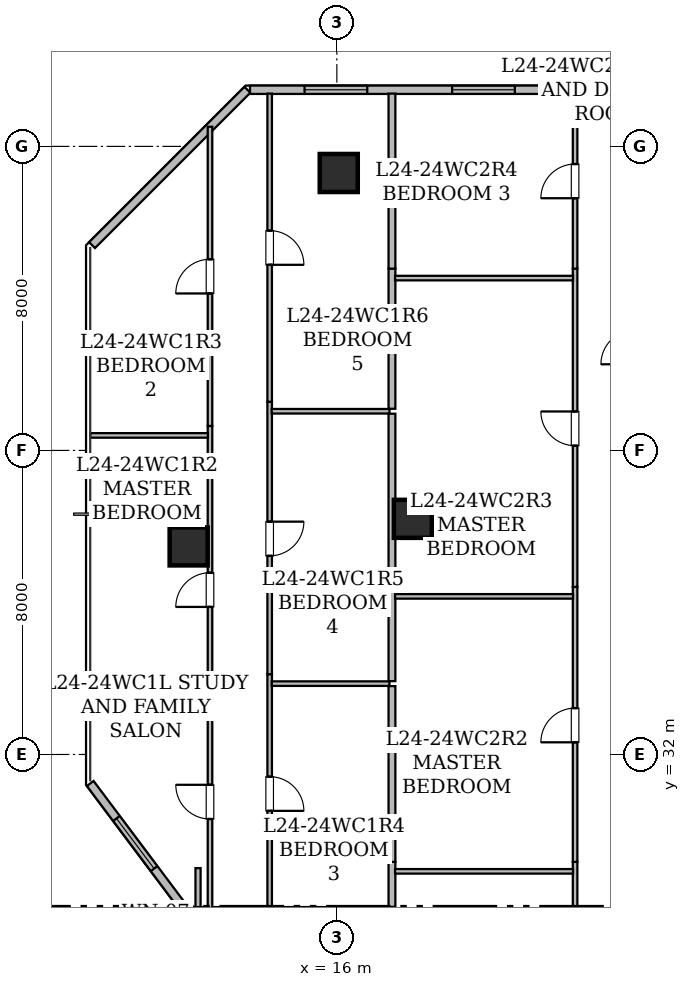
"""IFC4 building model, lengths in metres.
Left out: names, types, materials, properties, quantities, classifications, styles, units other than length and angle.
Written with IfcOpenShell. Run it as: python <this file> out.ifc"""

import sys

from ifc_helpers import new_model, si_unit, direction, frame, frame_2d, origin, origin_2d, place, context, subcontext, project, spatial, rectangle, hollow_rectangle, extrude, element, fill, save


model = new_model("IFC4")
c1 = context("Model", 3, precision=1e-05, world=origin(), true_north=direction((0.0, 1.0)))
c2 = subcontext(c1, "Body", "Model", "MODEL_VIEW")
j1 = project(units=[si_unit("LENGTHUNIT", "METRE"), si_unit("PLANEANGLEUNIT", "RADIAN")], contexts=[c1])
p1 = place(None, origin())
s1 = spatial("IfcSite", under=j1, at=p1, CompositionType="ELEMENT")
p2 = place(p1, origin())
s2 = spatial("IfcBuilding", under=s1, at=p2, CompositionType="ELEMENT")
p3 = place(p2, frame((0.0, 0.0, 98.25)))
s3 = spatial("IfcBuildingStorey", under=s2, at=p3, CompositionType="ELEMENT", Elevation=98.25)
for number, where, z_axis, x_axis in (
    (1, (16.05, 47.3, 0.0), (0.0, 0.0, 1.0), (1.0, 0.0, 0.0)),
    (2, (12.1, 37.475, 0.0), (0.0, 0.0, 1.0), (1.0, 0.0, 0.0)),
    (3, (18.0, 38.2, 0.0), (0.0, 0.0, 1.0), (1.0, 0.0, 0.0)),
):
    element("IfcColumn", number, at=place(p3, frame(where, z_axis=z_axis, x_axis=x_axis)), inside=s3, PredefinedType="COLUMN", context=c2, shape_type="SweptSolid", body=[
        extrude(hollow_rectangle(XDim=1.0, YDim=1.0, WallThickness=0.05, at=origin_2d()), origin(), (0.0, 0.0, 1.0), 3.65),
    ])
p4 = place(p3, frame((9.544, 24.808, 0.0), z_axis=(0.0, 0.0, 1.0), x_axis=(0.600019580308, 0.799985314394, 0.0)))
e4 = element("IfcWall", 4, at=p4, inside=s3, PredefinedType="STANDARD", context=c2, shape_type="SweptSolid", body=[
    extrude(rectangle(XDim=3.99, YDim=0.22, at=frame_2d((1.995, 0.0))), origin(), (0.0, 0.0, 1.0), 3.43),
])
p5 = place(p4, frame((2.147, 0.0, 0.85)))
e5 = element("IfcOpeningElement", 5, at=p5, cuts=e4, PredefinedType="OPENING", context=c2, shape_type="SweptSolid", body=[
    extrude(rectangle(XDim=1.35, YDim=1.5, at=frame_2d((0.675, 0.75))), frame((0.0, 0.12, 0.0), z_axis=(0.0, -1.0, 0.0), x_axis=(1.0, 0.0, 0.0)), (0.0, 0.0, 1.0), 0.24),
])
p6 = place(p3, frame((11.881, 28.077, 0.0), z_axis=(0.0, 0.0, 1.0), x_axis=(-0.600158184825, 0.799881336942, 0.0)))
e6 = element("IfcWall", 6, at=p6, inside=s3, PredefinedType="STANDARD", context=c2, shape_type="SweptSolid", body=[
    extrude(rectangle(XDim=3.951, YDim=0.22, at=frame_2d((1.975, 0.0))), origin(), (0.0, 0.0, 1.0), 3.43),
])
p7 = place(p6, frame((1.15, 0.0, 0.85)))
e7 = element("IfcOpeningElement", 7, at=p7, cuts=e6, PredefinedType="OPENING", context=c2, shape_type="SweptSolid", body=[
    extrude(rectangle(XDim=1.65, YDim=1.55, at=frame_2d((0.825, 0.775))), frame((0.0, 0.12, 0.0), z_axis=(0.0, -1.0, 0.0), x_axis=(1.0, 0.0, 0.0)), (0.0, 0.0, 1.0), 0.24),
])
p8 = place(p3, frame((9.558, 45.402, 0.0), z_axis=(0.0, 0.0, 1.0), x_axis=(0.707106781187, 0.707106781187, 0.0)))
e8 = element("IfcWall", 8, at=p8, inside=s3, PredefinedType="STANDARD", context=c2, shape_type="SweptSolid", body=[
    extrude(rectangle(XDim=5.781, YDim=0.22, at=frame_2d((2.891, 0.0))), origin(), (0.0, 0.0, 1.0), 3.43),
])
p9 = place(p3, frame((13.715, 49.49, 0.0), z_axis=(0.0, 0.0, 1.0), x_axis=(1.0, 0.0, 0.0)))
e9 = element("IfcWall", 9, at=p9, inside=s3, PredefinedType="STANDARD", context=c2, shape_type="SweptSolid", body=[
    extrude(rectangle(XDim=38.639, YDim=0.22, at=frame_2d((19.319, 0.0))), origin(), (0.0, 0.0, 1.0), 3.43),
])
p10 = place(p9, frame((1.435, 0.0, 0.85)))
e10 = element("IfcOpeningElement", 10, at=p10, cuts=e9, PredefinedType="OPENING", context=c2, shape_type="SweptSolid", body=[
    extrude(rectangle(XDim=1.65, YDim=1.55, at=frame_2d((0.825, 0.775))), frame((0.0, 0.12, 0.0), z_axis=(0.0, -1.0, 0.0), x_axis=(1.0, 0.0, 0.0)), (0.0, 0.0, 1.0), 0.24),
])
p11 = place(p9, frame((10.802, 0.0, 0.85)))
e11 = element("IfcOpeningElement", 11, at=p11, cuts=e9, PredefinedType="OPENING", context=c2, shape_type="SweptSolid", body=[
    extrude(rectangle(XDim=1.65, YDim=1.55, at=frame_2d((0.825, 0.775))), frame((0.0, 0.12, 0.0), z_axis=(0.0, -1.0, 0.0), x_axis=(1.0, 0.0, 0.0)), (0.0, 0.0, 1.0), 0.24),
])
p12 = place(p9, frame((8.744, 0.0, 0.8)))
e12 = element("IfcOpeningElement", 12, at=p12, cuts=e9, PredefinedType="OPENING", context=c2, shape_type="SweptSolid", body=[
    extrude(rectangle(XDim=1.2, YDim=1.5, at=frame_2d((0.6, 0.75))), frame((0.0, 0.12, 0.0), z_axis=(0.0, -1.0, 0.0), x_axis=(1.0, 0.0, 0.0)), (0.0, 0.0, 1.0), 0.24),
])
p13 = place(p9, frame((5.319, 0.0, 0.85)))
e13 = element("IfcOpeningElement", 13, at=p13, cuts=e9, PredefinedType="OPENING", context=c2, shape_type="SweptSolid", body=[
    extrude(rectangle(XDim=1.65, YDim=1.55, at=frame_2d((0.825, 0.775))), frame((0.0, 0.12, 0.0), z_axis=(0.0, -1.0, 0.0), x_axis=(1.0, 0.0, 0.0)), (0.0, 0.0, 1.0), 0.24),
])
p14 = place(p9, frame((15.556, 0.0, 0.85)))
e14 = element("IfcOpeningElement", 14, at=p14, cuts=e9, PredefinedType="OPENING", context=c2, shape_type="SweptSolid", body=[
    extrude(rectangle(XDim=1.65, YDim=1.55, at=frame_2d((0.825, 0.775))), frame((0.0, 0.12, 0.0), z_axis=(0.0, -1.0, 0.0), x_axis=(1.0, 0.0, 0.0)), (0.0, 0.0, 1.0), 0.24),
])
p15 = place(p9, frame((22.821, 0.0, 0.85)))
e15 = element("IfcOpeningElement", 15, at=p15, cuts=e9, PredefinedType="OPENING", context=c2, shape_type="SweptSolid", body=[
    extrude(rectangle(XDim=1.65, YDim=1.55, at=frame_2d((0.825, 0.775))), frame((0.0, 0.12, 0.0), z_axis=(0.0, -1.0, 0.0), x_axis=(1.0, 0.0, 0.0)), (0.0, 0.0, 1.0), 0.24),
])
p16 = place(p9, frame((30.23, 0.0, 0.85)))
e16 = element("IfcOpeningElement", 16, at=p16, cuts=e9, PredefinedType="OPENING", context=c2, shape_type="SweptSolid", body=[
    extrude(rectangle(XDim=1.65, YDim=1.55, at=frame_2d((0.825, 0.775))), frame((0.0, 0.12, 0.0), z_axis=(0.0, -1.0, 0.0), x_axis=(1.0, 0.0, 0.0)), (0.0, 0.0, 1.0), 0.24),
])
p17 = place(p9, frame((36.367, 0.0, 0.85)))
e17 = element("IfcOpeningElement", 17, at=p17, cuts=e9, PredefinedType="OPENING", context=c2, shape_type="SweptSolid", body=[
    extrude(rectangle(XDim=1.65, YDim=1.55, at=frame_2d((0.825, 0.775))), frame((0.0, 0.12, 0.0), z_axis=(0.0, -1.0, 0.0), x_axis=(1.0, 0.0, 0.0)), (0.0, 0.0, 1.0), 0.24),
])
p18 = place(p3, frame((12.347, 22.832, 0.0), z_axis=(0.0, 0.0, 1.0), x_axis=(0.0, 1.0, 0.0)))
e18 = element("IfcWall", 18, at=p18, inside=s3, PredefinedType="PARTITIONING", context=c2, shape_type="SweptSolid", body=[
    extrude(rectangle(XDim=6.178, YDim=0.135, at=frame_2d((3.089, 0.0))), origin(), (0.0, 0.0, 1.0), 2.876),
])
p19 = place(p3, frame((12.662, 25.26, 0.0), z_axis=(0.0, 0.0, 1.0), x_axis=(0.0, 1.0, 0.0)))
e19 = element("IfcWall", 19, at=p19, inside=s3, PredefinedType="PARTITIONING", context=c2, shape_type="SweptSolid", body=[
    extrude(rectangle(XDim=8.567, YDim=0.12, at=frame_2d((4.283, 0.0))), origin(), (0.0, 0.0, 1.0), 2.687),
])
p20 = place(p19, frame((5.042, 0.0, 0.0)))
e20 = element("IfcOpeningElement", 20, at=p20, cuts=e19, PredefinedType="OPENING", context=c2, shape_type="SweptSolid", body=[
    extrude(rectangle(XDim=0.9, YDim=2.1, at=frame_2d((0.45, 1.05))), frame((0.0, 0.07, 0.0), z_axis=(0.0, -1.0, 0.0), x_axis=(1.0, 0.0, 0.0)), (0.0, 0.0, 1.0), 0.14),
])
p21 = place(p3, frame((12.662, 33.827, 0.0), z_axis=(0.0, 0.0, 1.0), x_axis=(0.0, 1.0, 0.0)))
e21 = element("IfcWall", 21, at=p21, inside=s3, PredefinedType="PARTITIONING", context=c2, shape_type="SweptSolid", body=[
    extrude(rectangle(XDim=6.817, YDim=0.12, at=frame_2d((3.409, 0.0))), origin(), (0.0, 0.0, 1.0), 2.687),
])
p22 = place(p21, frame((2.055, 0.0, 0.0)))
e22 = element("IfcOpeningElement", 22, at=p22, cuts=e21, PredefinedType="OPENING", context=c2, shape_type="SweptSolid", body=[
    extrude(rectangle(XDim=0.9, YDim=2.1, at=frame_2d((0.45, 1.05))), frame((0.0, 0.07, 0.0), z_axis=(0.0, -1.0, 0.0), x_axis=(1.0, 0.0, 0.0)), (0.0, 0.0, 1.0), 0.14),
])
p23 = place(p3, frame((12.662, 40.644, 0.0), z_axis=(0.0, 0.0, 1.0), x_axis=(0.0, 1.0, 0.0)))
e23 = element("IfcWall", 23, at=p23, inside=s3, PredefinedType="PARTITIONING", context=c2, shape_type="SweptSolid", body=[
    extrude(rectangle(XDim=7.873, YDim=0.12, at=frame_2d((3.937, 0.0))), origin(), (0.0, 0.0, 1.0), 3.43),
])
p24 = place(p23, frame((3.486, 0.0, 0.0)))
e24 = element("IfcOpeningElement", 24, at=p24, cuts=e23, PredefinedType="OPENING", context=c2, shape_type="SweptSolid", body=[
    extrude(rectangle(XDim=0.9, YDim=2.1, at=frame_2d((0.45, 1.05))), frame((0.0, 0.07, 0.0), z_axis=(0.0, -1.0, 0.0), x_axis=(1.0, 0.0, 0.0)), (0.0, 0.0, 1.0), 0.14),
])
p25 = place(p3, frame((14.232, 34.113, 0.0), z_axis=(0.0, 0.0, 1.0), x_axis=(0.0, -1.0, 0.0)))
e25 = element("IfcWall", 25, at=p25, inside=s3, PredefinedType="PARTITIONING", context=c2, shape_type="SweptSolid", body=[
    extrude(rectangle(XDim=6.253, YDim=0.12, at=frame_2d((3.126, 0.0))), origin(), (0.0, 0.0, 1.0), 2.687),
])
p26 = place(p25, frame((2.697, 0.0, 0.0)))
e26 = element("IfcOpeningElement", 26, at=p26, cuts=e25, PredefinedType="OPENING", context=c2, shape_type="SweptSolid", body=[
    extrude(rectangle(XDim=0.9, YDim=2.1, at=frame_2d((0.45, 1.05))), frame((0.0, 0.07, 0.0), z_axis=(0.0, -1.0, 0.0), x_axis=(1.0, 0.0, 0.0)), (0.0, 0.0, 1.0), 0.14),
])
p27 = place(p3, frame((14.232, 41.28, 0.0), z_axis=(0.0, 0.0, 1.0), x_axis=(0.0, -1.0, 0.0)))
e27 = element("IfcWall", 27, at=p27, inside=s3, PredefinedType="PARTITIONING", context=c2, shape_type="SweptSolid", body=[
    extrude(rectangle(XDim=7.167, YDim=0.12, at=frame_2d((3.583, 0.0))), origin(), (0.0, 0.0, 1.0), 2.687),
])
p28 = place(p27, frame((3.154, 0.0, 0.0)))
e28 = element("IfcOpeningElement", 28, at=p28, cuts=e27, PredefinedType="OPENING", context=c2, shape_type="SweptSolid", body=[
    extrude(rectangle(XDim=0.9, YDim=2.1, at=frame_2d((0.45, 1.05))), frame((0.0, 0.07, 0.0), z_axis=(0.0, -1.0, 0.0), x_axis=(1.0, 0.0, 0.0)), (0.0, 0.0, 1.0), 0.14),
])
p29 = place(p3, frame((14.232, 49.388, 0.0), z_axis=(0.0, 0.0, 1.0), x_axis=(0.0, -1.0, 0.0)))
e29 = element("IfcWall", 29, at=p29, inside=s3, PredefinedType="PARTITIONING", context=c2, shape_type="SweptSolid", body=[
    extrude(rectangle(XDim=8.108, YDim=0.12, at=frame_2d((4.054, 0.0))), origin(), (0.0, 0.0, 1.0), 2.876),
])
p30 = place(p29, frame((3.604, 0.0, 0.0)))
e30 = element("IfcOpeningElement", 30, at=p30, cuts=e29, PredefinedType="OPENING", context=c2, shape_type="SweptSolid", body=[
    extrude(rectangle(XDim=0.9, YDim=2.1, at=frame_2d((0.45, 1.05))), frame((0.0, 0.07, 0.0), z_axis=(0.0, -1.0, 0.0), x_axis=(1.0, 0.0, 0.0)), (0.0, 0.0, 1.0), 0.14),
])
p31 = place(p3, frame((9.51, 33.578, 0.0), z_axis=(0.0, 0.0, 1.0), x_axis=(1.0, 0.0, 0.0)))
e31 = element("IfcWall", 31, at=p31, inside=s3, PredefinedType="PARTITIONING", context=c2, shape_type="SweptSolid", body=[
    extrude(rectangle(XDim=3.098, YDim=0.12, at=frame_2d((1.549, 0.0))), origin(), (0.0, 0.0, 1.0), 2.687),
])
p32 = place(p3, frame((9.51, 40.395, 0.0), z_axis=(0.0, 0.0, 1.0), x_axis=(1.0, 0.0, 0.0)))
e32 = element("IfcWall", 32, at=p32, inside=s3, PredefinedType="PARTITIONING", context=c2, shape_type="SweptSolid", body=[
    extrude(rectangle(XDim=3.098, YDim=0.12, at=frame_2d((1.549, 0.0))), origin(), (0.0, 0.0, 1.0), 3.43),
])
p33 = place(p3, frame((14.286, 33.864, 0.0), z_axis=(0.0, 0.0, 1.0), x_axis=(1.0, 0.0, 0.0)))
e33 = element("IfcWall", 33, at=p33, inside=s3, PredefinedType="PARTITIONING", context=c2, shape_type="SweptSolid", body=[
    extrude(rectangle(XDim=3.099, YDim=0.12, at=frame_2d((1.55, 0.0))), origin(), (0.0, 0.0, 1.0), 3.43),
])
p34 = place(p3, frame((17.45, 29.174, 0.0), z_axis=(0.0, 0.0, 1.0), x_axis=(0.0, -1.0, 0.0)))
e34 = element("IfcWall", 34, at=p34, inside=s3, PredefinedType="STANDARD", context=c2, shape_type="SweptSolid", body=[
    extrude(rectangle(XDim=1.184, YDim=0.18, at=frame_2d((0.592, 0.0))), origin(), (0.0, 0.0, 1.0), 3.43),
])
p35 = place(p3, frame((17.45, 33.799, 0.0), z_axis=(0.0, 0.0, 1.0), x_axis=(0.0, -1.0, 0.0)))
e35 = element("IfcWall", 35, at=p35, inside=s3, PredefinedType="STANDARD", context=c2, shape_type="SweptSolid", body=[
    extrude(rectangle(XDim=4.625, YDim=0.18, at=frame_2d((2.312, 0.0))), origin(), (0.0, 0.0, 1.0), 2.687),
])
p36 = place(p3, frame((14.286, 41.031, 0.0), z_axis=(0.0, 0.0, 1.0), x_axis=(1.0, 0.0, 0.0)))
e36 = element("IfcWall", 36, at=p36, inside=s3, PredefinedType="PARTITIONING", context=c2, shape_type="SweptSolid", body=[
    extrude(rectangle(XDim=3.099, YDim=0.12, at=frame_2d((1.55, 0.0))), origin(), (0.0, 0.0, 1.0), 2.647),
])
p37 = place(p3, frame((17.45, 36.409, 0.0), z_axis=(0.0, 0.0, 1.0), x_axis=(0.0, -1.0, 0.0)))
e37 = element("IfcWall", 37, at=p37, inside=s3, PredefinedType="STANDARD", context=c2, shape_type="SweptSolid", body=[
    extrude(rectangle(XDim=2.48, YDim=0.18, at=frame_2d((1.24, 0.0))), origin(), (0.0, 0.0, 1.0), 3.43),
])
p38 = place(p3, frame((17.45, 40.966, 0.0), z_axis=(0.0, 0.0, 1.0), x_axis=(0.0, -1.0, 0.0)))
e38 = element("IfcWall", 38, at=p38, inside=s3, PredefinedType="STANDARD", context=c2, shape_type="SweptSolid", body=[
    extrude(rectangle(XDim=4.557, YDim=0.18, at=frame_2d((2.279, 0.0))), origin(), (0.0, 0.0, 1.0), 2.647),
])
p39 = place(p3, frame((17.45, 44.784, 0.0), z_axis=(0.0, 0.0, 1.0), x_axis=(0.0, -1.0, 0.0)))
e39 = element("IfcWall", 39, at=p39, inside=s3, PredefinedType="STANDARD", context=c2, shape_type="SweptSolid", body=[
    extrude(rectangle(XDim=3.688, YDim=0.18, at=frame_2d((1.844, 0.0))), origin(), (0.0, 0.0, 1.0), 2.647),
])
p40 = place(p3, frame((17.45, 49.388, 0.0), z_axis=(0.0, 0.0, 1.0), x_axis=(0.0, -1.0, 0.0)))
e40 = element("IfcWall", 40, at=p40, inside=s3, PredefinedType="STANDARD", context=c2, shape_type="SweptSolid", body=[
    extrude(rectangle(XDim=4.604, YDim=0.18, at=frame_2d((2.302, 0.0))), origin(), (0.0, 0.0, 1.0), 2.876),
])
p41 = place(p3, frame((22.269, 22.832, 0.0), z_axis=(0.0, 0.0, 1.0), x_axis=(0.0, 1.0, 0.0)))
e41 = element("IfcWall", 41, at=p41, inside=s3, PredefinedType="PARTITIONING", context=c2, shape_type="SweptSolid", body=[
    extrude(rectangle(XDim=6.342, YDim=0.12, at=frame_2d((3.171, 0.0))), origin(), (0.0, 0.0, 1.0), 2.961),
])
p42 = place(p41, frame((2.7, 0.0, 0.0)))
e42 = element("IfcOpeningElement", 42, at=p42, cuts=e41, PredefinedType="OPENING", context=c2, shape_type="SweptSolid", body=[
    extrude(rectangle(XDim=0.9, YDim=2.1, at=frame_2d((0.45, 1.05))), frame((0.0, 0.07, 0.0), z_axis=(0.0, -1.0, 0.0), x_axis=(1.0, 0.0, 0.0)), (0.0, 0.0, 1.0), 0.14),
])
p43 = place(p3, frame((22.269, 29.174, 0.0), z_axis=(0.0, 0.0, 1.0), x_axis=(0.0, 1.0, 0.0)))
e43 = element("IfcWall", 43, at=p43, inside=s3, PredefinedType="PARTITIONING", context=c2, shape_type="SweptSolid", body=[
    extrude(rectangle(XDim=7.235, YDim=0.12, at=frame_2d((3.617, 0.0))), origin(), (0.0, 0.0, 1.0), 3.43),
])
p44 = place(p43, frame((3.146, 0.0, 0.0)))
e44 = element("IfcOpeningElement", 44, at=p44, cuts=e43, PredefinedType="OPENING", context=c2, shape_type="SweptSolid", body=[
    extrude(rectangle(XDim=0.9, YDim=2.1, at=frame_2d((0.45, 1.05))), frame((0.0, 0.07, 0.0), z_axis=(0.0, -1.0, 0.0), x_axis=(1.0, 0.0, 0.0)), (0.0, 0.0, 1.0), 0.14),
])
p45 = place(p3, frame((22.269, 36.409, 0.0), z_axis=(0.0, 0.0, 1.0), x_axis=(0.0, 1.0, 0.0)))
e45 = element("IfcWall", 45, at=p45, inside=s3, PredefinedType="PARTITIONING", context=c2, shape_type="SweptSolid", body=[
    extrude(rectangle(XDim=8.375, YDim=0.12, at=frame_2d((4.188, 0.0))), origin(), (0.0, 0.0, 1.0), 2.647),
])
p46 = place(p45, frame((3.716, 0.0, 0.0)))
e46 = element("IfcOpeningElement", 46, at=p46, cuts=e45, PredefinedType="OPENING", context=c2, shape_type="SweptSolid", body=[
    extrude(rectangle(XDim=0.9, YDim=2.1, at=frame_2d((0.45, 1.05))), frame((0.0, 0.07, 0.0), z_axis=(0.0, -1.0, 0.0), x_axis=(1.0, 0.0, 0.0)), (0.0, 0.0, 1.0), 0.14),
])
p47 = place(p3, frame((22.269, 44.784, 0.0), z_axis=(0.0, 0.0, 1.0), x_axis=(0.0, 1.0, 0.0)))
e47 = element("IfcWall", 47, at=p47, inside=s3, PredefinedType="PARTITIONING", context=c2, shape_type="SweptSolid", body=[
    extrude(rectangle(XDim=4.604, YDim=0.12, at=frame_2d((2.302, 0.0))), origin(), (0.0, 0.0, 1.0), 2.876),
])
p48 = place(p47, frame((1.852, 0.0, 0.0)))
e48 = element("IfcOpeningElement", 48, at=p48, cuts=e47, PredefinedType="OPENING", context=c2, shape_type="SweptSolid", body=[
    extrude(rectangle(XDim=0.9, YDim=2.1, at=frame_2d((0.45, 1.05))), frame((0.0, 0.07, 0.0), z_axis=(0.0, -1.0, 0.0), x_axis=(1.0, 0.0, 0.0)), (0.0, 0.0, 1.0), 0.14),
])
for number, where, z_axis, x_axis in (
    (49, (17.532, 28.925, 0.0), (0.0, 0.0, 1.0), (1.0, 0.0, 0.0)),
    (50, (17.532, 36.16, 0.0), (0.0, 0.0, 1.0), (1.0, 0.0, 0.0)),
):
    element("IfcWall", number, at=place(p3, frame(where, z_axis=z_axis, x_axis=x_axis)), inside=s3, PredefinedType="PARTITIONING", context=c2, shape_type="SweptSolid", body=[
        extrude(rectangle(XDim=4.683, YDim=0.12, at=frame_2d((2.342, 0.0))), origin(), (0.0, 0.0, 1.0), 2.647),
    ])
p49 = place(p3, frame((17.532, 44.535, 0.0), z_axis=(0.0, 0.0, 1.0), x_axis=(1.0, 0.0, 0.0)))
e51 = element("IfcWall", 51, at=p49, inside=s3, PredefinedType="PARTITIONING", context=c2, shape_type="SweptSolid", body=[
    extrude(rectangle(XDim=4.683, YDim=0.12, at=frame_2d((2.342, 0.0))), origin(), (0.0, 0.0, 1.0), 3.43),
])
p50 = place(p7, origin())
e52 = element("IfcWindow", 52, at=p50, inside=s3, PartitioningType="SINGLE_PANEL", PredefinedType="WINDOW", context=c2, shape_type="SweptSolid", body=[
    extrude(rectangle(XDim=1.65, YDim=1.55, at=frame_2d((0.825, 0.775))), frame((0.0, 0.03, 0.0), z_axis=(0.0, -1.0, 0.0), x_axis=(1.0, 0.0, 0.0)), (0.0, 0.0, 1.0), 0.06),
])
fill(e7, e52)
p51 = place(p10, origin())
e53 = element("IfcWindow", 53, at=p51, inside=s3, PartitioningType="SINGLE_PANEL", PredefinedType="WINDOW", context=c2, shape_type="SweptSolid", body=[
    extrude(rectangle(XDim=1.65, YDim=1.55, at=frame_2d((0.825, 0.775))), frame((0.0, 0.03, 0.0), z_axis=(0.0, -1.0, 0.0), x_axis=(1.0, 0.0, 0.0)), (0.0, 0.0, 1.0), 0.06),
])
fill(e10, e53)
p52 = place(p12, origin())
e54 = element("IfcWindow", 54, at=p52, inside=s3, PartitioningType="SINGLE_PANEL", PredefinedType="WINDOW", context=c2, shape_type="SweptSolid", body=[
    extrude(rectangle(XDim=1.2, YDim=1.5, at=frame_2d((0.6, 0.75))), frame((0.0, 0.03, 0.0), z_axis=(0.0, -1.0, 0.0), x_axis=(1.0, 0.0, 0.0)), (0.0, 0.0, 1.0), 0.06),
])
fill(e12, e54)
p53 = place(p13, origin())
e55 = element("IfcWindow", 55, at=p53, inside=s3, PartitioningType="SINGLE_PANEL", PredefinedType="WINDOW", context=c2, shape_type="SweptSolid", body=[
    extrude(rectangle(XDim=1.65, YDim=1.55, at=frame_2d((0.825, 0.775))), frame((0.0, 0.03, 0.0), z_axis=(0.0, -1.0, 0.0), x_axis=(1.0, 0.0, 0.0)), (0.0, 0.0, 1.0), 0.06),
])
fill(e13, e55)
p54 = place(p20, origin())
e56 = element("IfcDoor", 56, at=p54, inside=s3, OperationType="SINGLE_SWING_RIGHT", PredefinedType="DOOR", context=c2, shape_type="SweptSolid", body=[
    extrude(rectangle(XDim=0.9, YDim=2.1, at=frame_2d((0.45, 1.05))), frame((0.0, 0.025, 0.0), z_axis=(0.0, -1.0, 0.0), x_axis=(1.0, 0.0, 0.0)), (0.0, 0.0, 1.0), 0.05),
])
fill(e20, e56)
p55 = place(p22, origin())
e57 = element("IfcDoor", 57, at=p55, inside=s3, OperationType="SINGLE_SWING_LEFT", PredefinedType="DOOR", context=c2, shape_type="SweptSolid", body=[
    extrude(rectangle(XDim=0.9, YDim=2.1, at=frame_2d((0.45, 1.05))), frame((0.0, 0.025, 0.0), z_axis=(0.0, -1.0, 0.0), x_axis=(1.0, 0.0, 0.0)), (0.0, 0.0, 1.0), 0.05),
])
fill(e22, e57)
p56 = place(p24, origin())
e58 = element("IfcDoor", 58, at=p56, inside=s3, OperationType="SINGLE_SWING_LEFT", PredefinedType="DOOR", context=c2, shape_type="SweptSolid", body=[
    extrude(rectangle(XDim=0.9, YDim=2.1, at=frame_2d((0.45, 1.05))), frame((0.0, 0.025, 0.0), z_axis=(0.0, -1.0, 0.0), x_axis=(1.0, 0.0, 0.0)), (0.0, 0.0, 1.0), 0.05),
])
fill(e24, e58)
p57 = place(p26, origin())
e59 = element("IfcDoor", 59, at=p57, inside=s3, OperationType="SINGLE_SWING_RIGHT", PredefinedType="DOOR", context=c2, shape_type="SweptSolid", body=[
    extrude(rectangle(XDim=0.9, YDim=2.1, at=frame_2d((0.45, 1.05))), frame((0.0, 0.025, 0.0), z_axis=(0.0, -1.0, 0.0), x_axis=(1.0, 0.0, 0.0)), (0.0, 0.0, 1.0), 0.05),
])
fill(e26, e59)
p58 = place(p28, origin())
e60 = element("IfcDoor", 60, at=p58, inside=s3, OperationType="SINGLE_SWING_LEFT", PredefinedType="DOOR", context=c2, shape_type="SweptSolid", body=[
    extrude(rectangle(XDim=0.9, YDim=2.1, at=frame_2d((0.45, 1.05))), frame((0.0, 0.025, 0.0), z_axis=(0.0, -1.0, 0.0), x_axis=(1.0, 0.0, 0.0)), (0.0, 0.0, 1.0), 0.05),
])
fill(e28, e60)
p59 = place(p30, origin())
e61 = element("IfcDoor", 61, at=p59, inside=s3, OperationType="SINGLE_SWING_RIGHT", PredefinedType="DOOR", context=c2, shape_type="SweptSolid", body=[
    extrude(rectangle(XDim=0.9, YDim=2.1, at=frame_2d((0.45, 1.05))), frame((0.0, 0.025, 0.0), z_axis=(0.0, -1.0, 0.0), x_axis=(1.0, 0.0, 0.0)), (0.0, 0.0, 1.0), 0.05),
])
fill(e30, e61)
p60 = place(p44, origin())
e62 = element("IfcDoor", 62, at=p60, inside=s3, OperationType="SINGLE_SWING_LEFT", PredefinedType="DOOR", context=c2, shape_type="SweptSolid", body=[
    extrude(rectangle(XDim=0.9, YDim=2.1, at=frame_2d((0.45, 1.05))), frame((0.0, 0.025, 0.0), z_axis=(0.0, -1.0, 0.0), x_axis=(1.0, 0.0, 0.0)), (0.0, 0.0, 1.0), 0.05),
])
fill(e44, e62)
p61 = place(p46, origin())
e63 = element("IfcDoor", 63, at=p61, inside=s3, OperationType="SINGLE_SWING_RIGHT", PredefinedType="DOOR", context=c2, shape_type="SweptSolid", body=[
    extrude(rectangle(XDim=0.9, YDim=2.1, at=frame_2d((0.45, 1.05))), frame((0.0, 0.025, 0.0), z_axis=(0.0, -1.0, 0.0), x_axis=(1.0, 0.0, 0.0)), (0.0, 0.0, 1.0), 0.05),
])
fill(e46, e63)
p62 = place(p48, origin())
e64 = element("IfcDoor", 64, at=p62, inside=s3, OperationType="SINGLE_SWING_LEFT", PredefinedType="DOOR", context=c2, shape_type="SweptSolid", body=[
    extrude(rectangle(XDim=0.9, YDim=2.1, at=frame_2d((0.45, 1.05))), frame((0.0, 0.025, 0.0), z_axis=(0.0, -1.0, 0.0), x_axis=(1.0, 0.0, 0.0)), (0.0, 0.0, 1.0), 0.05),
])
fill(e48, e64)
save(model, sys.argv[1])
